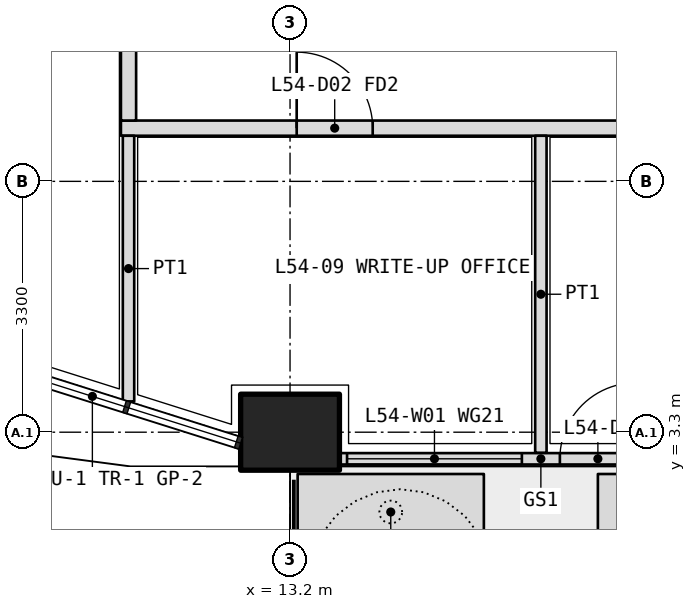
"""IFC4 building model, lengths in metres.
Left out: names, types, materials, properties, quantities, classifications, styles, units other than length and angle.
Written with IfcOpenShell. Run it as: python <this file> out.ifc"""

import sys

from ifc_helpers import new_model, si_unit, direction, frame, frame_2d, origin, origin_2d, place, context, subcontext, project, spatial, polyline, rectangle, outline, extrude, element, fill, save


model = new_model("IFC4")
c1 = context("Model", 3, precision=1e-05, world=origin(), true_north=direction((0.0, 1.0)))
c2 = subcontext(c1, "Body", "Model", "MODEL_VIEW")
j1 = project(units=[si_unit("LENGTHUNIT", "METRE"), si_unit("PLANEANGLEUNIT", "RADIAN")], contexts=[c1])
p1 = place(None, origin())
s1 = spatial("IfcSite", under=j1, at=p1, CompositionType="ELEMENT")
p2 = place(p1, origin())
s2 = spatial("IfcBuilding", under=s1, at=p2, CompositionType="ELEMENT")
p3 = place(p2, frame((0.0, 0.0, 237.6)))
s3 = spatial("IfcBuildingStorey", under=s2, at=p3, CompositionType="ELEMENT", Elevation=237.6)
p4 = place(p3, frame((13.2, 3.3, 0.0), z_axis=(0.0, 0.0, 1.0), x_axis=(1.0, 0.0, 0.0)))
e1 = element("IfcColumn", 1, at=p4, inside=s3, PredefinedType="COLUMN", context=c2, shape_type="SweptSolid", body=[
    extrude(rectangle(XDim=1.3, YDim=1.0, at=origin_2d()), origin(), (0.0, 0.0, 1.0), 4.2),
])
p5 = place(p3, origin())
e2 = element("IfcWall", 2, at=p5, inside=s3, PredefinedType="USERDEFINED", context=c2, shape_type="SweptSolid", body=[
    extrude(outline(polyline([(13.3, 1.75), (15.75, 1.75), (15.75, 2.75), (13.3, 2.75), (13.3, 1.75)]), holes=[polyline([(13.45, 1.9), (15.6, 1.9), (15.6, 2.6), (13.45, 2.6), (13.45, 1.9)])]), origin(), (0.0, 0.0, 1.0), 1.05),
])
p6 = place(p3, origin())
e3 = element("IfcWall", 3, at=p6, inside=s3, PredefinedType="USERDEFINED", context=c2, shape_type="SweptSolid", body=[
    extrude(outline(polyline([(17.25, 1.75), (26.3, 1.75), (26.3, 2.75), (17.25, 2.75), (17.25, 1.75)]), holes=[polyline([(17.4, 1.9), (26.15, 1.9), (26.15, 2.6), (17.4, 2.6), (17.4, 1.9)])]), origin(), (0.0, 0.0, 1.0), 1.05),
])
p7 = place(p3, frame((13.85, 2.95, 0.0), z_axis=(0.0, 0.0, 1.0), x_axis=(1.0, 0.0, 0.0)))
e4 = element("IfcWall", 4, at=p7, inside=s3, PredefinedType="SOLIDWALL", context=c2, shape_type="SweptSolid", body=[
    extrude(rectangle(XDim=5.3, YDim=0.15, at=frame_2d((2.65, 0.0))), origin(), (0.0, 0.0, 1.0), 2.7),
])
p8 = place(p7, frame((2.9, 0.0, 0.0)))
e5 = element("IfcOpeningElement", 5, at=p8, cuts=e4, PredefinedType="OPENING", context=c2, shape_type="SweptSolid", body=[
    extrude(rectangle(XDim=1.0, YDim=2.4, at=frame_2d((0.5, 1.2))), frame((0.0, 0.085, 0.0), z_axis=(0.0, -1.0, 0.0), x_axis=(1.0, 0.0, 0.0)), (0.0, 0.0, 1.0), 0.17),
])
p9 = place(p7, frame((0.1, 0.0, 0.1)))
e6 = element("IfcOpeningElement", 6, at=p9, cuts=e4, PredefinedType="OPENING", context=c2, shape_type="SweptSolid", body=[
    extrude(rectangle(XDim=2.3, YDim=2.3, at=frame_2d((1.15, 1.15))), frame((0.0, 0.085, 0.0), z_axis=(0.0, -1.0, 0.0), x_axis=(1.0, 0.0, 0.0)), (0.0, 0.0, 1.0), 0.17),
])
p10 = place(p7, frame((4.0, 0.0, 0.1)))
e7 = element("IfcOpeningElement", 7, at=p10, cuts=e4, PredefinedType="OPENING", context=c2, shape_type="SweptSolid", body=[
    extrude(rectangle(XDim=1.2, YDim=2.3, at=frame_2d((0.6, 1.15))), frame((0.0, 0.085, 0.0), z_axis=(0.0, -1.0, 0.0), x_axis=(1.0, 0.0, 0.0)), (0.0, 0.0, 1.0), 0.17),
])
p11 = place(p3, frame((10.975, 7.3, 0.0), z_axis=(0.0, 0.0, 1.0), x_axis=(1.0, 0.0, 0.0)))
e8 = element("IfcWall", 8, at=p11, inside=s3, PredefinedType="PARTITIONING", context=c2, shape_type="SweptSolid", body=[
    extrude(rectangle(XDim=30.85, YDim=0.2, at=frame_2d((15.425, 0.0))), origin(), (0.0, 0.0, 1.0), 3.0),
])
p12 = place(p11, frame((2.312, 0.0, 0.0)))
e9 = element("IfcOpeningElement", 9, at=p12, cuts=e8, PredefinedType="OPENING", context=c2, shape_type="SweptSolid", body=[
    extrude(rectangle(XDim=1.0, YDim=2.1, at=frame_2d((0.5, 1.05))), frame((0.0, 0.11, 0.0), z_axis=(0.0, -1.0, 0.0), x_axis=(1.0, 0.0, 0.0)), (0.0, 0.0, 1.0), 0.22),
])
p13 = place(p11, frame((13.275, 0.0, 0.0)))
e10 = element("IfcOpeningElement", 10, at=p13, cuts=e8, PredefinedType="OPENING", context=c2, shape_type="SweptSolid", body=[
    extrude(rectangle(XDim=1.0, YDim=2.1, at=frame_2d((0.5, 1.05))), frame((0.0, 0.11, 0.0), z_axis=(0.0, -1.0, 0.0), x_axis=(1.0, 0.0, 0.0)), (0.0, 0.0, 1.0), 0.22),
])
p14 = place(p11, frame((23.625, 0.0, 0.0)))
e11 = element("IfcOpeningElement", 11, at=p14, cuts=e8, PredefinedType="OPENING", context=c2, shape_type="SweptSolid", body=[
    extrude(rectangle(XDim=1.0, YDim=2.1, at=frame_2d((0.5, 1.05))), frame((0.0, 0.11, 0.0), z_axis=(0.0, -1.0, 0.0), x_axis=(1.0, 0.0, 0.0)), (0.0, 0.0, 1.0), 0.22),
])
p15 = place(p11, frame((26.925, 0.0, 0.0)))
e12 = element("IfcOpeningElement", 12, at=p15, cuts=e8, PredefinedType="OPENING", context=c2, shape_type="SweptSolid", body=[
    extrude(rectangle(XDim=1.0, YDim=2.1, at=frame_2d((0.5, 1.05))), frame((0.0, 0.11, 0.0), z_axis=(0.0, -1.0, 0.0), x_axis=(1.0, 0.0, 0.0)), (0.0, 0.0, 1.0), 0.22),
])
p16 = place(p11, frame((29.188, 0.0, 0.0)))
e13 = element("IfcOpeningElement", 13, at=p16, cuts=e8, PredefinedType="OPENING", context=c2, shape_type="SweptSolid", body=[
    extrude(rectangle(XDim=1.0, YDim=2.1, at=frame_2d((0.5, 1.05))), frame((0.0, 0.11, 0.0), z_axis=(0.0, -1.0, 0.0), x_axis=(1.0, 0.0, 0.0)), (0.0, 0.0, 1.0), 0.22),
])
p17 = place(p3, frame((11.075, 7.4, 0.0), z_axis=(0.0, 0.0, 1.0), x_axis=(0.0, 1.0, 0.0)))
e14 = element("IfcWall", 14, at=p17, inside=s3, PredefinedType="PARTITIONING", context=c2, shape_type="SweptSolid", body=[
    extrude(rectangle(XDim=31.4, YDim=0.2, at=frame_2d((15.7, 0.0))), origin(), (0.0, 0.0, 1.0), 3.0),
])
p18 = place(p17, frame((2.35, 0.0, 0.0)))
e15 = element("IfcOpeningElement", 15, at=p18, cuts=e14, PredefinedType="OPENING", context=c2, shape_type="SweptSolid", body=[
    extrude(rectangle(XDim=1.0, YDim=2.1, at=frame_2d((0.5, 1.05))), frame((0.0, 0.11, 0.0), z_axis=(0.0, -1.0, 0.0), x_axis=(1.0, 0.0, 0.0)), (0.0, 0.0, 1.0), 0.22),
])
p19 = place(p17, frame((6.9, 0.0, 0.0)))
e16 = element("IfcOpeningElement", 16, at=p19, cuts=e14, PredefinedType="OPENING", context=c2, shape_type="SweptSolid", body=[
    extrude(rectangle(XDim=1.0, YDim=2.1, at=frame_2d((0.5, 1.05))), frame((0.0, 0.11, 0.0), z_axis=(0.0, -1.0, 0.0), x_axis=(1.0, 0.0, 0.0)), (0.0, 0.0, 1.0), 0.22),
])
p20 = place(p17, frame((10.35, 0.0, 0.0)))
e17 = element("IfcOpeningElement", 17, at=p20, cuts=e14, PredefinedType="OPENING", context=c2, shape_type="SweptSolid", body=[
    extrude(rectangle(XDim=0.9, YDim=2.1, at=frame_2d((0.45, 1.05))), frame((0.0, 0.11, 0.0), z_axis=(0.0, -1.0, 0.0), x_axis=(1.0, 0.0, 0.0)), (0.0, 0.0, 1.0), 0.22),
])
p21 = place(p17, frame((13.7, 0.0, 0.0)))
e18 = element("IfcOpeningElement", 18, at=p21, cuts=e14, PredefinedType="OPENING", context=c2, shape_type="SweptSolid", body=[
    extrude(rectangle(XDim=0.9, YDim=2.1, at=frame_2d((0.45, 1.05))), frame((0.0, 0.11, 0.0), z_axis=(0.0, -1.0, 0.0), x_axis=(1.0, 0.0, 0.0)), (0.0, 0.0, 1.0), 0.22),
])
p22 = place(p17, frame((18.5, 0.0, 0.0)))
e19 = element("IfcOpeningElement", 19, at=p22, cuts=e14, PredefinedType="OPENING", context=c2, shape_type="SweptSolid", body=[
    extrude(rectangle(XDim=1.0, YDim=2.1, at=frame_2d((0.5, 1.05))), frame((0.0, 0.11, 0.0), z_axis=(0.0, -1.0, 0.0), x_axis=(1.0, 0.0, 0.0)), (0.0, 0.0, 1.0), 0.22),
])
p23 = place(p17, frame((26.4, 0.0, 0.0)))
e20 = element("IfcOpeningElement", 20, at=p23, cuts=e14, PredefinedType="OPENING", context=c2, shape_type="SweptSolid", body=[
    extrude(rectangle(XDim=1.0, YDim=2.1, at=frame_2d((0.5, 1.05))), frame((0.0, 0.11, 0.0), z_axis=(0.0, -1.0, 0.0), x_axis=(1.0, 0.0, 0.0)), (0.0, 0.0, 1.0), 0.22),
])
p24 = place(p3, frame((11.075, 3.705, 0.0), z_axis=(0.0, 0.0, 1.0), x_axis=(0.0, 1.0, 0.0)))
e21 = element("IfcWall", 21, at=p24, inside=s3, PredefinedType="PARTITIONING", context=c2, shape_type="SweptSolid", body=[
    extrude(rectangle(XDim=3.495, YDim=0.15, at=frame_2d((1.748, 0.0))), origin(), (0.0, 0.0, 1.0), 2.7),
])
p25 = place(p3, frame((16.5, 3.03, 0.0), z_axis=(0.0, 0.0, 1.0), x_axis=(0.0, 1.0, 0.0)))
e22 = element("IfcWall", 22, at=p25, inside=s3, PredefinedType="PARTITIONING", context=c2, shape_type="SweptSolid", body=[
    extrude(rectangle(XDim=4.17, YDim=0.15, at=frame_2d((2.085, 0.0))), origin(), (0.0, 0.0, 1.0), 2.7),
])
p26 = place(p8, origin())
e23 = element("IfcDoor", 23, at=p26, inside=s3, OperationType="SINGLE_SWING_RIGHT", PredefinedType="DOOR", context=c2, shape_type="SweptSolid", body=[
    extrude(rectangle(XDim=1.0, YDim=2.4, at=frame_2d((0.5, 1.2))), frame((0.0, 0.025, 0.0), z_axis=(0.0, -1.0, 0.0), x_axis=(1.0, 0.0, 0.0)), (0.0, 0.0, 1.0), 0.05),
])
fill(e5, e23)
p27 = place(p9, origin())
e24 = element("IfcWindow", 24, at=p27, inside=s3, PartitioningType="SINGLE_PANEL", PredefinedType="WINDOW", context=c2, shape_type="SweptSolid", body=[
    extrude(rectangle(XDim=2.3, YDim=2.3, at=frame_2d((1.15, 1.15))), frame((0.0, 0.03, 0.0), z_axis=(0.0, -1.0, 0.0), x_axis=(1.0, 0.0, 0.0)), (0.0, 0.0, 1.0), 0.06),
])
fill(e6, e24)
p28 = place(p12, origin())
e25 = element("IfcDoor", 25, at=p28, inside=s3, OperationType="SINGLE_SWING_LEFT", PredefinedType="DOOR", context=c2, shape_type="SweptSolid", body=[
    extrude(rectangle(XDim=1.0, YDim=2.1, at=frame_2d((0.5, 1.05))), frame((0.0, 0.025, 0.0), z_axis=(0.0, -1.0, 0.0), x_axis=(1.0, 0.0, 0.0)), (0.0, 0.0, 1.0), 0.05),
])
fill(e9, e25)
save(model, sys.argv[1])
